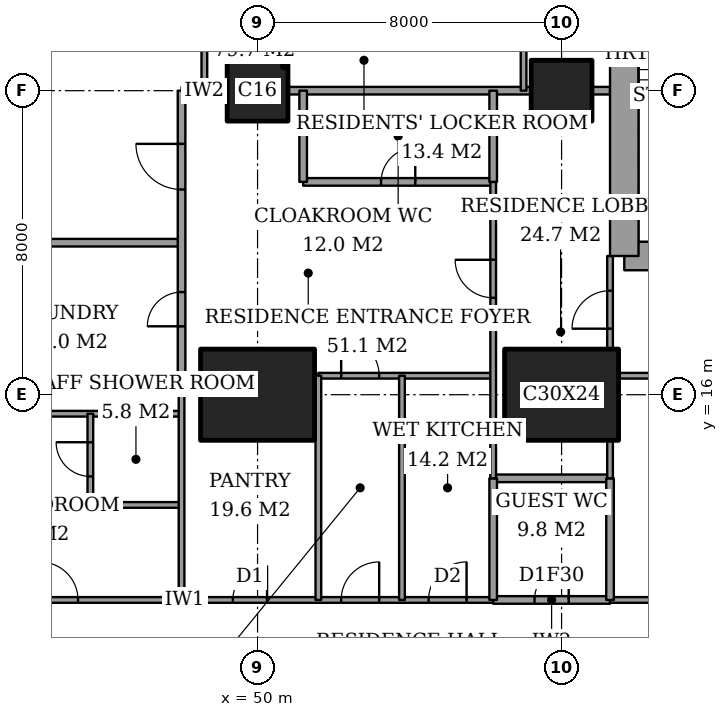
"""IFC4 building model, lengths in metres.
Left out: names, types, materials, properties, quantities, classifications, styles, units other than length and angle.
Written with IfcOpenShell. Run it as: python <this file> out.ifc"""

import sys

from ifc_helpers import new_model, si_unit, direction, frame, frame_2d, origin, origin_2d, place, context, subcontext, project, spatial, rectangle, extrude, element, fill, save


model = new_model("IFC4")
c1 = context("Model", 3, precision=1e-05, world=origin(), true_north=direction((0.0, 1.0)))
c2 = subcontext(c1, "Body", "Model", "MODEL_VIEW")
j1 = project(units=[si_unit("LENGTHUNIT", "METRE"), si_unit("PLANEANGLEUNIT", "RADIAN")], contexts=[c1])
p1 = place(None, origin())
s1 = spatial("IfcSite", under=j1, at=p1, CompositionType="ELEMENT")
p2 = place(p1, origin())
s2 = spatial("IfcBuilding", under=s1, at=p2, CompositionType="ELEMENT")
p3 = place(p2, frame((0.0, 0.0, 262.8)))
s3 = spatial("IfcBuildingStorey", under=s2, at=p3, CompositionType="ELEMENT", Elevation=262.8)
p4 = place(p3, frame((50.0, 16.0, 0.0), z_axis=(0.0, 0.0, 1.0), x_axis=(1.0, 0.0, 0.0)))
e1 = element("IfcColumn", 1, at=p4, inside=s3, PredefinedType="COLUMN", context=c2, shape_type="SweptSolid", body=[
    extrude(rectangle(XDim=3.0, YDim=2.4, at=origin_2d()), origin(), (0.0, 0.0, 1.0), 3.6),
])
p5 = place(p3, frame((50.0, 24.0, 0.0), z_axis=(0.0, 0.0, 1.0), x_axis=(1.0, 0.0, 0.0)))
e2 = element("IfcColumn", 2, at=p5, inside=s3, PredefinedType="COLUMN", context=c2, shape_type="SweptSolid", body=[
    extrude(rectangle(XDim=1.6, YDim=1.6, at=origin_2d()), origin(), (0.0, 0.0, 1.0), 3.6),
])
p6 = place(p3, frame((58.0, 16.0, 0.0), z_axis=(0.0, 0.0, 1.0), x_axis=(1.0, 0.0, 0.0)))
e3 = element("IfcColumn", 3, at=p6, inside=s3, PredefinedType="COLUMN", context=c2, shape_type="SweptSolid", body=[
    extrude(rectangle(XDim=3.0, YDim=2.4, at=origin_2d()), origin(), (0.0, 0.0, 1.0), 3.6),
])
p7 = place(p3, frame((58.0, 24.0, 0.0), z_axis=(0.0, 0.0, 1.0), x_axis=(1.0, 0.0, 0.0)))
e4 = element("IfcColumn", 4, at=p7, inside=s3, PredefinedType="COLUMN", context=c2, shape_type="SweptSolid", body=[
    extrude(rectangle(XDim=1.6, YDim=1.6, at=origin_2d()), origin(), (0.0, 0.0, 1.0), 3.6),
])
p8 = place(p3, frame((59.65, 19.65, 0.0), z_axis=(0.0, 0.0, 1.0), x_axis=(1.0, 0.0, 0.0)))
e5 = element("IfcWall", 5, at=p8, inside=s3, PredefinedType="SHEAR", context=c2, shape_type="SweptSolid", body=[
    extrude(rectangle(XDim=4.45, YDim=0.75, at=frame_2d((2.225, 0.0))), origin(), (0.0, 0.0, 1.0), 3.6),
])
p9 = place(p3, frame((59.65, 28.35, 0.0), z_axis=(0.0, 0.0, 1.0), x_axis=(0.0, -1.0, 0.0)))
e6 = element("IfcWall", 6, at=p9, inside=s3, PredefinedType="SHEAR", context=c2, shape_type="SweptSolid", body=[
    extrude(rectangle(XDim=8.7, YDim=0.75, at=frame_2d((4.35, 0.0))), origin(), (0.0, 0.0, 1.0), 3.6),
])
p10 = place(p9, frame((0.975, 0.0, 0.0)))
e7 = element("IfcOpeningElement", 7, at=p10, cuts=e6, PredefinedType="OPENING", context=c2, shape_type="SweptSolid", body=[
    extrude(rectangle(XDim=1.0, YDim=2.1, at=frame_2d((0.5, 1.05))), frame((0.0, 0.385, 0.0), z_axis=(0.0, -1.0, 0.0), x_axis=(1.0, 0.0, 0.0)), (0.0, 0.0, 1.0), 0.77),
])
p11 = place(p3, frame((56.2, 10.6, 0.0), z_axis=(0.0, 0.0, 1.0), x_axis=(1.0, 0.0, 0.0)))
e8 = element("IfcWall", 8, at=p11, inside=s3, PredefinedType="PARTITIONING", context=c2, shape_type="SweptSolid", body=[
    extrude(rectangle(XDim=3.075, YDim=0.2, at=frame_2d((1.538, 0.0))), origin(), (0.0, 0.0, 1.0), 3.35),
])
p12 = place(p11, frame((1.087, 0.0, 0.0)))
e9 = element("IfcOpeningElement", 9, at=p12, cuts=e8, PredefinedType="OPENING", context=c2, shape_type="SweptSolid", body=[
    extrude(rectangle(XDim=0.9, YDim=2.1, at=frame_2d((0.45, 1.05))), frame((0.0, 0.11, 0.0), z_axis=(0.0, -1.0, 0.0), x_axis=(1.0, 0.0, 0.0)), (0.0, 0.0, 1.0), 0.22),
])
p13 = place(p3, frame((41.439, 10.6, 0.0), z_axis=(0.0, 0.0, 1.0), x_axis=(1.0, 0.0, 0.0)))
e10 = element("IfcWall", 10, at=p13, inside=s3, PredefinedType="PARTITIONING", context=c2, shape_type="SweptSolid", body=[
    extrude(rectangle(XDim=14.761, YDim=0.15, at=frame_2d((7.38, 0.0))), origin(), (0.0, 0.0, 1.0), 3.35),
])
p14 = place(p13, frame((10.761, 0.0, 0.0)))
e11 = element("IfcOpeningElement", 11, at=p14, cuts=e10, PredefinedType="OPENING", context=c2, shape_type="SweptSolid", body=[
    extrude(rectangle(XDim=1.0, YDim=2.1, at=frame_2d((0.5, 1.05))), frame((0.0, 0.085, 0.0), z_axis=(0.0, -1.0, 0.0), x_axis=(1.0, 0.0, 0.0)), (0.0, 0.0, 1.0), 0.17),
])
p15 = place(p13, frame((13.061, 0.0, 0.0)))
e12 = element("IfcOpeningElement", 12, at=p15, cuts=e10, PredefinedType="OPENING", context=c2, shape_type="SweptSolid", body=[
    extrude(rectangle(XDim=1.0, YDim=2.1, at=frame_2d((0.5, 1.05))), frame((0.0, 0.085, 0.0), z_axis=(0.0, -1.0, 0.0), x_axis=(1.0, 0.0, 0.0)), (0.0, 0.0, 1.0), 0.17),
])
p16 = place(p13, frame((7.911, 0.0, 0.0)))
e13 = element("IfcOpeningElement", 13, at=p16, cuts=e10, PredefinedType="OPENING", context=c2, shape_type="SweptSolid", body=[
    extrude(rectangle(XDim=0.9, YDim=2.1, at=frame_2d((0.45, 1.05))), frame((0.0, 0.085, 0.0), z_axis=(0.0, -1.0, 0.0), x_axis=(1.0, 0.0, 0.0)), (0.0, 0.0, 1.0), 0.17),
])
p17 = place(p13, frame((2.836, 0.0, 0.0)))
e14 = element("IfcOpeningElement", 14, at=p17, cuts=e10, PredefinedType="OPENING", context=c2, shape_type="SweptSolid", body=[
    extrude(rectangle(XDim=1.0, YDim=2.1, at=frame_2d((0.5, 1.05))), frame((0.0, 0.085, 0.0), z_axis=(0.0, -1.0, 0.0), x_axis=(1.0, 0.0, 0.0)), (0.0, 0.0, 1.0), 0.17),
])
p18 = place(p3, frame((59.275, 10.6, 0.0), z_axis=(0.0, 0.0, 1.0), x_axis=(1.0, 0.0, 0.0)))
e15 = element("IfcWall", 15, at=p18, inside=s3, PredefinedType="PARTITIONING", context=c2, shape_type="SweptSolid", body=[
    extrude(rectangle(XDim=7.175, YDim=0.15, at=frame_2d((3.587, 0.0))), origin(), (0.0, 0.0, 1.0), 3.35),
])
p19 = place(p18, frame((3.087, 0.0, 0.0)))
e16 = element("IfcOpeningElement", 16, at=p19, cuts=e15, PredefinedType="OPENING", context=c2, shape_type="SweptSolid", body=[
    extrude(rectangle(XDim=1.0, YDim=2.1, at=frame_2d((0.5, 1.05))), frame((0.0, 0.085, 0.0), z_axis=(0.0, -1.0, 0.0), x_axis=(1.0, 0.0, 0.0)), (0.0, 0.0, 1.0), 0.17),
])
p20 = place(p3, frame((45.6, 13.1, 0.0), z_axis=(0.0, 0.0, 1.0), x_axis=(1.0, 0.0, 0.0)))
e17 = element("IfcWall", 17, at=p20, inside=s3, PredefinedType="PARTITIONING", context=c2, shape_type="SweptSolid", body=[
    extrude(rectangle(XDim=2.4, YDim=0.15, at=frame_2d((1.2, 0.0))), origin(), (0.0, 0.0, 1.0), 3.35),
])
p21 = place(p3, frame((56.2, 13.8, 0.0), z_axis=(0.0, 0.0, 1.0), x_axis=(1.0, 0.0, 0.0)))
e18 = element("IfcWall", 18, at=p21, inside=s3, PredefinedType="PARTITIONING", context=c2, shape_type="SweptSolid", body=[
    extrude(rectangle(XDim=3.075, YDim=0.2, at=frame_2d((1.538, 0.0))), origin(), (0.0, 0.0, 1.0), 3.35),
])
p22 = place(p3, frame((42.0, 15.5, 0.0), z_axis=(0.0, 0.0, 1.0), x_axis=(1.0, 0.0, 0.0)))
e19 = element("IfcWall", 19, at=p22, inside=s3, PredefinedType="PARTITIONING", context=c2, shape_type="SweptSolid", body=[
    extrude(rectangle(XDim=6.0, YDim=0.15, at=frame_2d((3.0, 0.0))), origin(), (0.0, 0.0, 1.0), 3.35),
])
p23 = place(p3, frame((48.0, 16.05, 0.0), z_axis=(0.0, 0.0, 1.0), x_axis=(1.0, 0.0, 0.0)))
e20 = element("IfcWall", 20, at=p23, inside=s3, PredefinedType="PARTITIONING", context=c2, shape_type="SweptSolid", body=[
    extrude(rectangle(XDim=0.5, YDim=0.15, at=frame_2d((0.25, 0.0))), origin(), (0.0, 0.0, 1.0), 2.634),
])
p24 = place(p3, frame((51.6, 16.5, 0.0), z_axis=(0.0, 0.0, 1.0), x_axis=(1.0, 0.0, 0.0)))
e21 = element("IfcWall", 21, at=p24, inside=s3, PredefinedType="PARTITIONING", context=c2, shape_type="SweptSolid", body=[
    extrude(rectangle(XDim=4.6, YDim=0.15, at=frame_2d((2.3, 0.0))), origin(), (0.0, 0.0, 1.0), 3.35),
])
p25 = place(p24, frame((0.6, 0.0, 0.0)))
e22 = element("IfcOpeningElement", 22, at=p25, cuts=e21, PredefinedType="OPENING", context=c2, shape_type="SweptSolid", body=[
    extrude(rectangle(XDim=1.0, YDim=2.1, at=frame_2d((0.5, 1.05))), frame((0.0, 0.085, 0.0), z_axis=(0.0, -1.0, 0.0), x_axis=(1.0, 0.0, 0.0)), (0.0, 0.0, 1.0), 0.17),
])
p26 = place(p3, frame((59.5, 16.5, 0.0), z_axis=(0.0, 0.0, 1.0), x_axis=(1.0, 0.0, 0.0)))
e23 = element("IfcWall", 23, at=p26, inside=s3, PredefinedType="PARTITIONING", context=c2, shape_type="SweptSolid", body=[
    extrude(rectangle(XDim=5.35, YDim=0.15, at=frame_2d((2.675, 0.0))), origin(), (0.0, 0.0, 1.0), 3.35),
])
p27 = place(p3, frame((42.0, 20.0, 0.0), z_axis=(0.0, 0.0, 1.0), x_axis=(1.0, 0.0, 0.0)))
e24 = element("IfcWall", 24, at=p27, inside=s3, PredefinedType="PARTITIONING", context=c2, shape_type="SweptSolid", body=[
    extrude(rectangle(XDim=6.0, YDim=0.2, at=frame_2d((3.0, 0.0))), origin(), (0.0, 0.0, 1.0), 3.35),
])
p28 = place(p3, frame((51.2, 21.6, 0.0), z_axis=(0.0, 0.0, 1.0), x_axis=(1.0, 0.0, 0.0)))
e25 = element("IfcWall", 25, at=p28, inside=s3, PredefinedType="PARTITIONING", context=c2, shape_type="SweptSolid", body=[
    extrude(rectangle(XDim=5.0, YDim=0.2, at=frame_2d((2.5, 0.0))), origin(), (0.0, 0.0, 1.0), 3.35),
])
p29 = place(p28, frame((2.05, 0.0, 0.0)))
e26 = element("IfcOpeningElement", 26, at=p29, cuts=e25, PredefinedType="OPENING", context=c2, shape_type="SweptSolid", body=[
    extrude(rectangle(XDim=0.9, YDim=2.1, at=frame_2d((0.45, 1.05))), frame((0.0, 0.11, 0.0), z_axis=(0.0, -1.0, 0.0), x_axis=(1.0, 0.0, 0.0)), (0.0, 0.0, 1.0), 0.22),
])
p30 = place(p3, frame((48.0, 24.0, 0.0), z_axis=(0.0, 0.0, 1.0), x_axis=(1.0, 0.0, 0.0)))
e27 = element("IfcWall", 27, at=p30, inside=s3, PredefinedType="PARTITIONING", context=c2, shape_type="SweptSolid", body=[
    extrude(rectangle(XDim=1.2, YDim=0.2, at=frame_2d((0.6, 0.0))), origin(), (0.0, 0.0, 1.0), 3.35),
])
p31 = place(p3, frame((50.8, 24.0, 0.0), z_axis=(0.0, 0.0, 1.0), x_axis=(1.0, 0.0, 0.0)))
e28 = element("IfcWall", 28, at=p31, inside=s3, PredefinedType="PARTITIONING", context=c2, shape_type="SweptSolid", body=[
    extrude(rectangle(XDim=6.4, YDim=0.2, at=frame_2d((3.2, 0.0))), origin(), (0.0, 0.0, 1.0), 3.35),
])
p32 = place(p3, frame((58.8, 24.0, 0.0), z_axis=(0.0, 0.0, 1.0), x_axis=(1.0, 0.0, 0.0)))
e29 = element("IfcWall", 29, at=p32, inside=s3, PredefinedType="PARTITIONING", context=c2, shape_type="SweptSolid", body=[
    extrude(rectangle(XDim=0.475, YDim=0.2, at=frame_2d((0.237, 0.0))), origin(), (0.0, 0.0, 1.0), 3.35),
])
p33 = place(p3, frame((45.6, 13.1, 0.0), z_axis=(0.0, 0.0, 1.0), x_axis=(0.0, 1.0, 0.0)))
e30 = element("IfcWall", 30, at=p33, inside=s3, PredefinedType="PARTITIONING", context=c2, shape_type="SweptSolid", body=[
    extrude(rectangle(XDim=2.4, YDim=0.15, at=frame_2d((1.2, 0.0))), origin(), (0.0, 0.0, 1.0), 3.35),
])
p34 = place(p33, frame((0.75, 0.0, 0.0)))
e31 = element("IfcOpeningElement", 31, at=p34, cuts=e30, PredefinedType="OPENING", context=c2, shape_type="SweptSolid", body=[
    extrude(rectangle(XDim=0.9, YDim=2.1, at=frame_2d((0.45, 1.05))), frame((0.0, 0.085, 0.0), z_axis=(0.0, -1.0, 0.0), x_axis=(1.0, 0.0, 0.0)), (0.0, 0.0, 1.0), 0.17),
])
p35 = place(p3, frame((48.0, 16.5, 0.0), z_axis=(0.0, 0.0, 1.0), x_axis=(0.0, 1.0, 0.0)))
e32 = element("IfcWall", 32, at=p35, inside=s3, PredefinedType="PARTITIONING", context=c2, shape_type="SweptSolid", body=[
    extrude(rectangle(XDim=7.5, YDim=0.2, at=frame_2d((3.75, 0.0))), origin(), (0.0, 0.0, 1.0), 3.35),
])
p36 = place(p35, frame((4.9, 0.0, 0.0)))
e33 = element("IfcOpeningElement", 33, at=p36, cuts=e32, PredefinedType="OPENING", context=c2, shape_type="SweptSolid", body=[
    extrude(rectangle(XDim=1.2, YDim=2.4, at=frame_2d((0.6, 1.2))), frame((0.0, 0.11, 0.0), z_axis=(0.0, -1.0, 0.0), x_axis=(1.0, 0.0, 0.0)), (0.0, 0.0, 1.0), 0.22),
])
p37 = place(p35, frame((1.3, 0.0, 0.0)))
e34 = element("IfcOpeningElement", 34, at=p37, cuts=e32, PredefinedType="OPENING", context=c2, shape_type="SweptSolid", body=[
    extrude(rectangle(XDim=0.9, YDim=2.1, at=frame_2d((0.45, 1.05))), frame((0.0, 0.11, 0.0), z_axis=(0.0, -1.0, 0.0), x_axis=(1.0, 0.0, 0.0)), (0.0, 0.0, 1.0), 0.22),
])
p38 = place(p3, frame((48.0, 10.6, 0.0), z_axis=(0.0, 0.0, 1.0), x_axis=(0.0, 1.0, 0.0)))
e35 = element("IfcWall", 35, at=p38, inside=s3, PredefinedType="PARTITIONING", context=c2, shape_type="SweptSolid", body=[
    extrude(rectangle(XDim=5.9, YDim=0.15, at=frame_2d((2.95, 0.0))), origin(), (0.0, 0.0, 1.0), 3.35),
])
p39 = place(p3, frame((48.6, 24.0, 0.0), z_axis=(0.0, 0.0, 1.0), x_axis=(0.0, 1.0, 0.0)))
e36 = element("IfcWall", 36, at=p39, inside=s3, PredefinedType="PARTITIONING", context=c2, shape_type="SweptSolid", body=[
    extrude(rectangle(XDim=1.6, YDim=0.15, at=frame_2d((0.8, 0.0))), origin(), (0.0, 0.0, 1.0), 3.35),
])
p40 = place(p3, frame((51.2, 21.6, 0.0), z_axis=(0.0, 0.0, 1.0), x_axis=(0.0, 1.0, 0.0)))
e37 = element("IfcWall", 37, at=p40, inside=s3, PredefinedType="PARTITIONING", context=c2, shape_type="SweptSolid", body=[
    extrude(rectangle(XDim=2.4, YDim=0.2, at=frame_2d((1.2, 0.0))), origin(), (0.0, 0.0, 1.0), 3.35),
])
for number, where, z_axis, x_axis in (
    (38, (51.6, 10.6, 0.0), (0.0, 0.0, 1.0), (0.0, 1.0, 0.0)),
    (39, (53.8, 10.6, 0.0), (0.0, 0.0, 1.0), (0.0, 1.0, 0.0)),
):
    element("IfcWall", number, at=place(p3, frame(where, z_axis=z_axis, x_axis=x_axis)), inside=s3, PredefinedType="PARTITIONING", context=c2, shape_type="SweptSolid", body=[
        extrude(rectangle(XDim=5.9, YDim=0.15, at=frame_2d((2.95, 0.0))), origin(), (0.0, 0.0, 1.0), 3.35),
    ])
p41 = place(p3, frame((56.2, 10.6, 0.0), z_axis=(0.0, 0.0, 1.0), x_axis=(0.0, 1.0, 0.0)))
e40 = element("IfcWall", 40, at=p41, inside=s3, PredefinedType="PARTITIONING", context=c2, shape_type="SweptSolid", body=[
    extrude(rectangle(XDim=3.2, YDim=0.2, at=frame_2d((1.6, 0.0))), origin(), (0.0, 0.0, 1.0), 3.35),
])
p42 = place(p3, frame((56.2, 21.6, 0.0), z_axis=(0.0, 0.0, 1.0), x_axis=(0.0, 1.0, 0.0)))
e41 = element("IfcWall", 41, at=p42, inside=s3, PredefinedType="PARTITIONING", context=c2, shape_type="SweptSolid", body=[
    extrude(rectangle(XDim=2.4, YDim=0.2, at=frame_2d((1.2, 0.0))), origin(), (0.0, 0.0, 1.0), 3.35),
])
p43 = place(p3, frame((56.2, 13.8, 0.0), z_axis=(0.0, 0.0, 1.0), x_axis=(0.0, 1.0, 0.0)))
e42 = element("IfcWall", 42, at=p43, inside=s3, PredefinedType="PARTITIONING", context=c2, shape_type="SweptSolid", body=[
    extrude(rectangle(XDim=7.8, YDim=0.15, at=frame_2d((3.9, 0.0))), origin(), (0.0, 0.0, 1.0), 3.35),
])
p44 = place(p43, frame((4.75, 0.0, 0.0)))
e43 = element("IfcOpeningElement", 43, at=p44, cuts=e42, PredefinedType="OPENING", context=c2, shape_type="SweptSolid", body=[
    extrude(rectangle(XDim=1.0, YDim=2.1, at=frame_2d((0.5, 1.05))), frame((0.0, 0.085, 0.0), z_axis=(0.0, -1.0, 0.0), x_axis=(1.0, 0.0, 0.0)), (0.0, 0.0, 1.0), 0.17),
])
p45 = place(p3, frame((57.0, 24.0, 0.0), z_axis=(0.0, 0.0, 1.0), x_axis=(0.0, 1.0, 0.0)))
e44 = element("IfcWall", 44, at=p45, inside=s3, PredefinedType="PARTITIONING", context=c2, shape_type="SweptSolid", body=[
    extrude(rectangle(XDim=1.6, YDim=0.15, at=frame_2d((0.8, 0.0))), origin(), (0.0, 0.0, 1.0), 3.35),
])
p46 = place(p3, frame((59.275, 10.6, 0.0), z_axis=(0.0, 0.0, 1.0), x_axis=(0.0, 1.0, 0.0)))
e45 = element("IfcWall", 45, at=p46, inside=s3, PredefinedType="PARTITIONING", context=c2, shape_type="SweptSolid", body=[
    extrude(rectangle(XDim=3.2, YDim=0.2, at=frame_2d((1.6, 0.0))), origin(), (0.0, 0.0, 1.0), 3.35),
])
p47 = place(p3, frame((59.275, 13.8, 0.0), z_axis=(0.0, 0.0, 1.0), x_axis=(0.0, 1.0, 0.0)))
e46 = element("IfcWall", 46, at=p47, inside=s3, PredefinedType="PARTITIONING", context=c2, shape_type="SweptSolid", body=[
    extrude(rectangle(XDim=1.0, YDim=0.15, at=frame_2d((0.5, 0.0))), origin(), (0.0, 0.0, 1.0), 3.35),
])
p48 = place(p3, frame((59.275, 17.2, 0.0), z_axis=(0.0, 0.0, 1.0), x_axis=(0.0, 1.0, 0.0)))
e47 = element("IfcWall", 47, at=p48, inside=s3, PredefinedType="PARTITIONING", context=c2, shape_type="SweptSolid", body=[
    extrude(rectangle(XDim=2.45, YDim=0.15, at=frame_2d((1.225, 0.0))), origin(), (0.0, 0.0, 1.0), 3.35),
])
p49 = place(p48, frame((0.538, 0.0, 0.0)))
e48 = element("IfcOpeningElement", 48, at=p49, cuts=e47, PredefinedType="OPENING", context=c2, shape_type="SweptSolid", body=[
    extrude(rectangle(XDim=1.0, YDim=2.1, at=frame_2d((0.5, 1.05))), frame((0.0, 0.085, 0.0), z_axis=(0.0, -1.0, 0.0), x_axis=(1.0, 0.0, 0.0)), (0.0, 0.0, 1.0), 0.17),
])
p50 = place(p14, origin())
e49 = element("IfcDoor", 49, at=p50, inside=s3, OperationType="SINGLE_SWING_LEFT", PredefinedType="DOOR", context=c2, shape_type="SweptSolid", body=[
    extrude(rectangle(XDim=1.0, YDim=2.1, at=frame_2d((0.5, 1.05))), frame((0.0, 0.025, 0.0), z_axis=(0.0, -1.0, 0.0), x_axis=(1.0, 0.0, 0.0)), (0.0, 0.0, 1.0), 0.05),
])
fill(e11, e49)
p51 = place(p49, origin())
e50 = element("IfcDoor", 50, at=p51, inside=s3, OperationType="SINGLE_SWING_RIGHT", PredefinedType="DOOR", context=c2, shape_type="SweptSolid", body=[
    extrude(rectangle(XDim=1.0, YDim=2.1, at=frame_2d((0.5, 1.05))), frame((0.0, 0.025, 0.0), z_axis=(0.0, -1.0, 0.0), x_axis=(1.0, 0.0, 0.0)), (0.0, 0.0, 1.0), 0.05),
])
fill(e48, e50)
p52 = place(p12, origin())
e51 = element("IfcDoor", 51, at=p52, inside=s3, OperationType="SINGLE_SWING_LEFT", PredefinedType="DOOR", context=c2, shape_type="SweptSolid", body=[
    extrude(rectangle(XDim=0.9, YDim=2.1, at=frame_2d((0.45, 1.05))), frame((0.0, 0.025, 0.0), z_axis=(0.0, -1.0, 0.0), x_axis=(1.0, 0.0, 0.0)), (0.0, 0.0, 1.0), 0.05),
])
fill(e9, e51)
p53 = place(p44, origin())
e52 = element("IfcDoor", 52, at=p53, inside=s3, OperationType="SINGLE_SWING_LEFT", PredefinedType="DOOR", context=c2, shape_type="SweptSolid", body=[
    extrude(rectangle(XDim=1.0, YDim=2.1, at=frame_2d((0.5, 1.05))), frame((0.0, 0.025, 0.0), z_axis=(0.0, -1.0, 0.0), x_axis=(1.0, 0.0, 0.0)), (0.0, 0.0, 1.0), 0.05),
])
fill(e43, e52)
p54 = place(p29, origin())
e53 = element("IfcDoor", 53, at=p54, inside=s3, OperationType="SINGLE_SWING_LEFT", PredefinedType="DOOR", context=c2, shape_type="SweptSolid", body=[
    extrude(rectangle(XDim=0.9, YDim=2.1, at=frame_2d((0.45, 1.05))), frame((0.0, 0.025, 0.0), z_axis=(0.0, -1.0, 0.0), x_axis=(1.0, 0.0, 0.0)), (0.0, 0.0, 1.0), 0.05),
])
fill(e26, e53)
p55 = place(p36, origin())
e54 = element("IfcDoor", 54, at=p55, inside=s3, OperationType="SINGLE_SWING_LEFT", PredefinedType="DOOR", context=c2, shape_type="SweptSolid", body=[
    extrude(rectangle(XDim=1.2, YDim=2.4, at=frame_2d((0.6, 1.2))), frame((0.0, 0.025, 0.0), z_axis=(0.0, -1.0, 0.0), x_axis=(1.0, 0.0, 0.0)), (0.0, 0.0, 1.0), 0.05),
])
fill(e33, e54)
p56 = place(p15, origin())
e55 = element("IfcDoor", 55, at=p56, inside=s3, OperationType="SINGLE_SWING_LEFT", PredefinedType="DOOR", context=c2, shape_type="SweptSolid", body=[
    extrude(rectangle(XDim=1.0, YDim=2.1, at=frame_2d((0.5, 1.05))), frame((0.0, 0.025, 0.0), z_axis=(0.0, -1.0, 0.0), x_axis=(1.0, 0.0, 0.0)), (0.0, 0.0, 1.0), 0.05),
])
fill(e12, e55)
p57 = place(p25, origin())
e56 = element("IfcDoor", 56, at=p57, inside=s3, OperationType="SINGLE_SWING_RIGHT", PredefinedType="DOOR", context=c2, shape_type="SweptSolid", body=[
    extrude(rectangle(XDim=1.0, YDim=2.1, at=frame_2d((0.5, 1.05))), frame((0.0, 0.025, 0.0), z_axis=(0.0, -1.0, 0.0), x_axis=(1.0, 0.0, 0.0)), (0.0, 0.0, 1.0), 0.05),
])
fill(e22, e56)
p58 = place(p16, origin())
e57 = element("IfcDoor", 57, at=p58, inside=s3, OperationType="SINGLE_SWING_LEFT", PredefinedType="DOOR", context=c2, shape_type="SweptSolid", body=[
    extrude(rectangle(XDim=0.9, YDim=2.1, at=frame_2d((0.45, 1.05))), frame((0.0, 0.025, 0.0), z_axis=(0.0, -1.0, 0.0), x_axis=(1.0, 0.0, 0.0)), (0.0, 0.0, 1.0), 0.05),
])
fill(e13, e57)
p59 = place(p34, origin())
e58 = element("IfcDoor", 58, at=p59, inside=s3, OperationType="SINGLE_SWING_LEFT", PredefinedType="DOOR", context=c2, shape_type="SweptSolid", body=[
    extrude(rectangle(XDim=0.9, YDim=2.1, at=frame_2d((0.45, 1.05))), frame((0.0, 0.025, 0.0), z_axis=(0.0, -1.0, 0.0), x_axis=(1.0, 0.0, 0.0)), (0.0, 0.0, 1.0), 0.05),
])
fill(e31, e58)
p60 = place(p17, origin())
e59 = element("IfcDoor", 59, at=p60, inside=s3, OperationType="SINGLE_SWING_RIGHT", PredefinedType="DOOR", context=c2, shape_type="SweptSolid", body=[
    extrude(rectangle(XDim=1.0, YDim=2.1, at=frame_2d((0.5, 1.05))), frame((0.0, 0.025, 0.0), z_axis=(0.0, -1.0, 0.0), x_axis=(1.0, 0.0, 0.0)), (0.0, 0.0, 1.0), 0.05),
])
fill(e14, e59)
p61 = place(p37, origin())
e60 = element("IfcDoor", 60, at=p61, inside=s3, OperationType="SINGLE_SWING_RIGHT", PredefinedType="DOOR", context=c2, shape_type="SweptSolid", body=[
    extrude(rectangle(XDim=0.9, YDim=2.1, at=frame_2d((0.45, 1.05))), frame((0.0, 0.025, 0.0), z_axis=(0.0, -1.0, 0.0), x_axis=(1.0, 0.0, 0.0)), (0.0, 0.0, 1.0), 0.05),
])
fill(e34, e60)
save(model, sys.argv[1])
